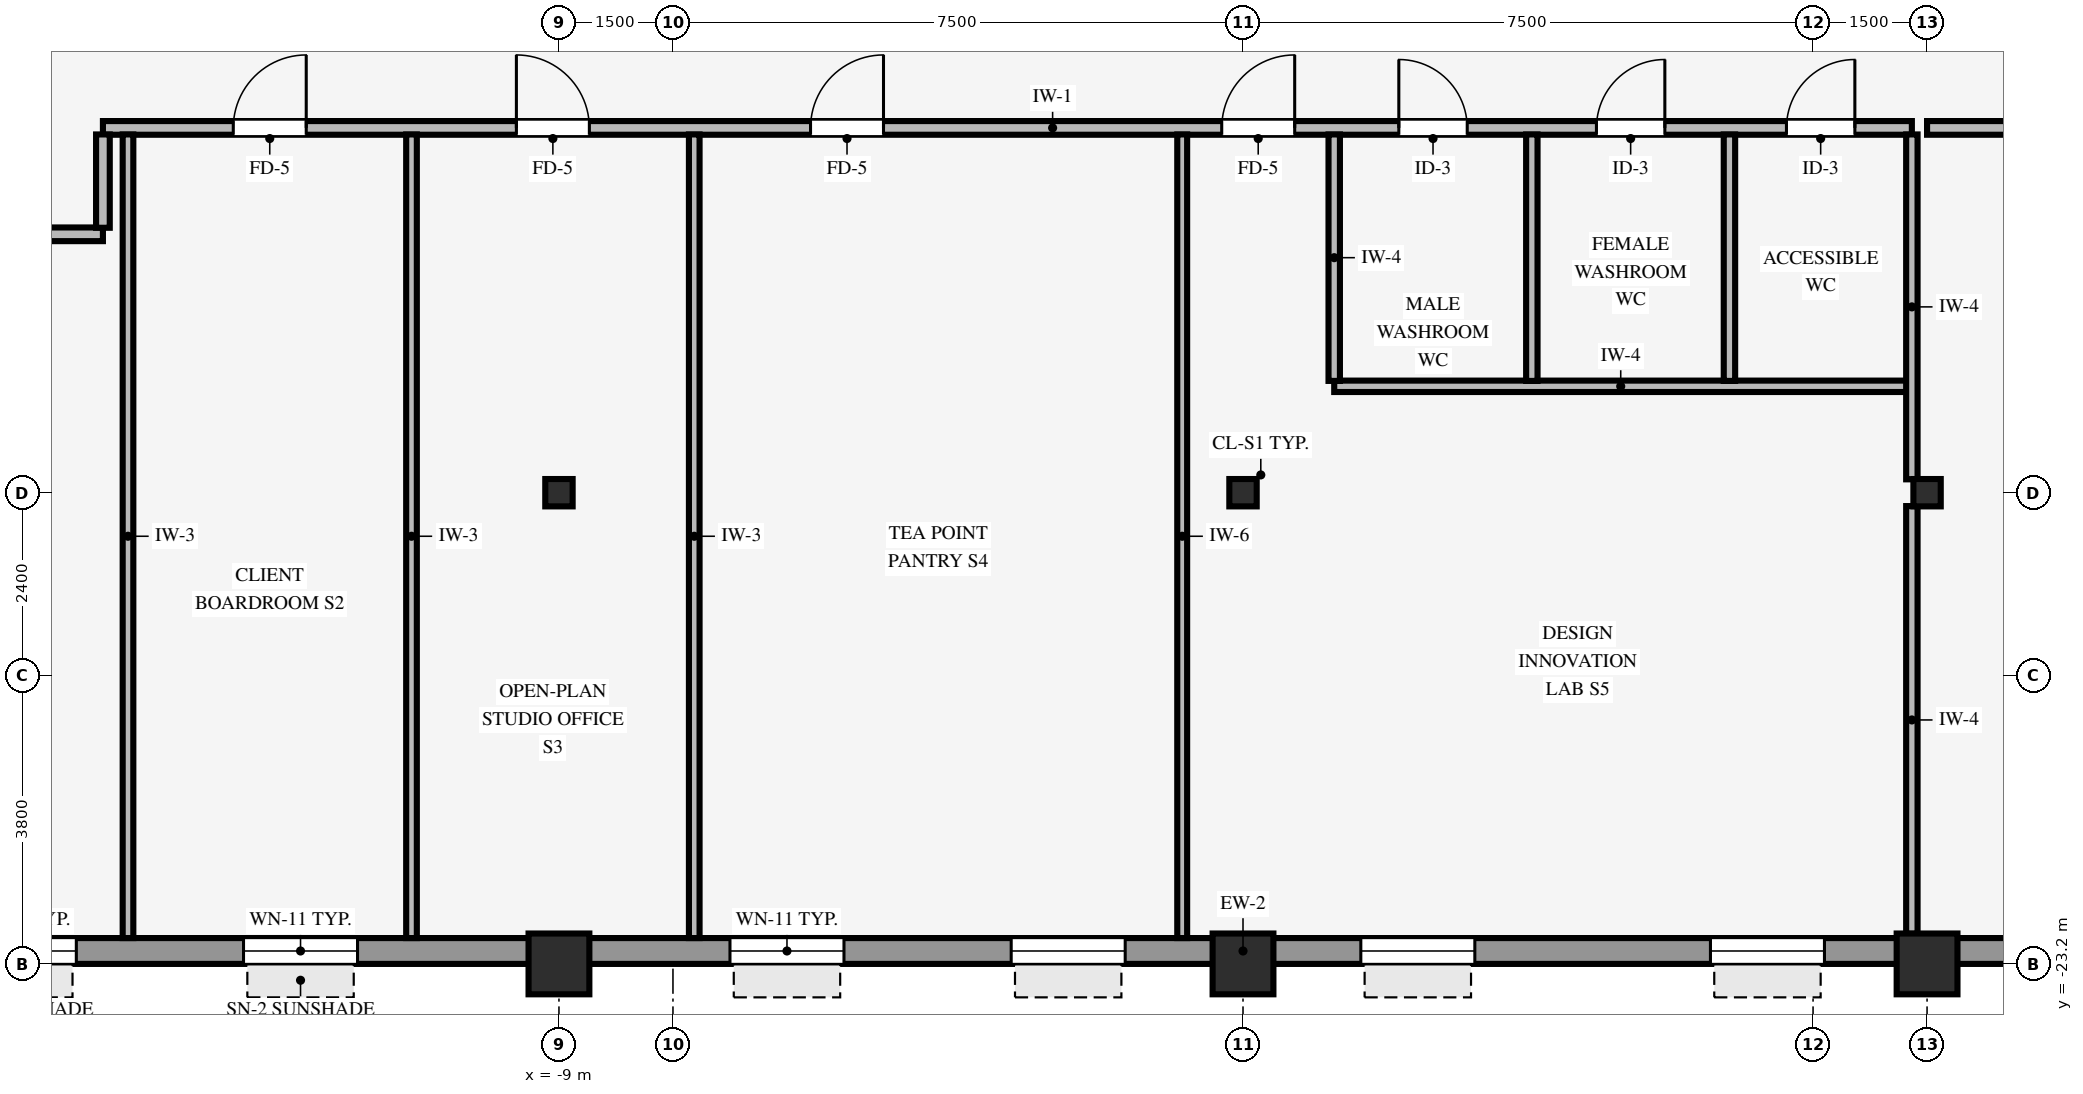
"""IFC4 building model, lengths in metres.
Left out: names, types, materials, properties, quantities, classifications, styles, units other than length and angle.
Written with IfcOpenShell. Run it as: python <this file> out.ifc"""

import sys

from ifc_helpers import new_model, si_unit, direction, frame, frame_2d, origin, origin_2d, place, context, subcontext, project, spatial, rectangle, hollow_rectangle, i_section, extrude, source, transform, mapped, element, fill, save


model = new_model("IFC4")
c1 = context("Model", 3, precision=1e-05, world=origin(), true_north=direction((0.0, 1.0)))
c2 = subcontext(c1, "Body", "Model", "MODEL_VIEW")
j1 = project(units=[si_unit("LENGTHUNIT", "METRE"), si_unit("PLANEANGLEUNIT", "RADIAN")], contexts=[c1])
p1 = place(None, origin())
s1 = spatial("IfcSite", under=j1, at=p1, CompositionType="ELEMENT")
p2 = place(p1, origin())
s2 = spatial("IfcBuilding", under=s1, at=p2, CompositionType="ELEMENT")
p3 = place(p2, frame((0.0, 0.0, 67.75)))
s3 = spatial("IfcBuildingStorey", under=s2, at=p3, CompositionType="ELEMENT", Elevation=67.75)
for number, where, z_axis, x_axis in (
    (1, (-9.0, -23.2, 0.0), (0.0, 0.0, 1.0), (1.0, 0.0, 0.0)),
    (2, (0.0, -23.2, 0.0), (0.0, 0.0, 1.0), (1.0, 0.0, 0.0)),
    (3, (9.0, -23.2, 0.0), (0.0, 0.0, 1.0), (1.0, 0.0, 0.0)),
):
    element("IfcColumn", number, at=place(p3, frame(where, z_axis=z_axis, x_axis=x_axis)), inside=s3, PredefinedType="COLUMN", context=c2, shape_type="SweptSolid", body=[
        extrude(hollow_rectangle(XDim=0.8, YDim=0.8, WallThickness=0.055, InnerFilletRadius=0.055, OuterFilletRadius=0.11, at=origin_2d()), origin(), (0.0, 0.0, 1.0), 3.37),
    ])
for number, where, z_axis, x_axis in (
    (4, (0.0, -17.0, 0.0), (0.0, 0.0, 1.0), (1.0, 0.0, 0.0)),
    (5, (-9.0, -17.0, 0.0), (0.0, 0.0, 1.0), (1.0, 0.0, 0.0)),
    (6, (9.0, -17.0, 0.0), (0.0, 0.0, 1.0), (1.0, 0.0, 0.0)),
):
    element("IfcColumn", number, at=place(p3, frame(where, z_axis=z_axis, x_axis=x_axis)), inside=s3, PredefinedType="COLUMN", context=c2, shape_type="SweptSolid", body=[
        extrude(i_section(OverallWidth=0.36, OverallDepth=0.36, WebThickness=0.021, FlangeThickness=0.021, FilletRadius=0.018, at=origin_2d()), origin(), (0.0, 0.0, 1.0), 3.37),
    ])
p4 = place(p3, frame((-19.4, -23.03, 0.0), z_axis=(0.0, 0.0, 1.0), x_axis=(1.0, 0.0, 0.0)))
e7 = element("IfcWall", 7, at=p4, inside=s3, PredefinedType="STANDARD", context=c2, shape_type="SweptSolid", body=[
    extrude(rectangle(XDim=38.8, YDim=0.34, at=frame_2d((19.4, 0.0))), origin(), (0.0, 0.0, 1.0), 2.705),
])
p5 = place(p4, frame((2.55, 0.0, 0.8)))
e8 = element("IfcOpeningElement", 8, at=p5, cuts=e7, PredefinedType="OPENING", context=c2, shape_type="SweptSolid", body=[
    extrude(rectangle(XDim=1.5, YDim=1.6, at=frame_2d((0.75, 0.8))), frame((0.0, 0.18, 0.0), z_axis=(0.0, -1.0, 0.0), x_axis=(1.0, 0.0, 0.0)), (0.0, 0.0, 1.0), 0.36),
])
p6 = place(p4, frame((6.25, 0.0, 0.8)))
e9 = element("IfcOpeningElement", 9, at=p6, cuts=e7, PredefinedType="OPENING", context=c2, shape_type="SweptSolid", body=[
    extrude(rectangle(XDim=1.5, YDim=1.6, at=frame_2d((0.75, 0.8))), frame((0.0, 0.18, 0.0), z_axis=(0.0, -1.0, 0.0), x_axis=(1.0, 0.0, 0.0)), (0.0, 0.0, 1.0), 0.36),
])
p7 = place(p4, frame((12.65, 0.0, 0.8)))
e10 = element("IfcOpeningElement", 10, at=p7, cuts=e7, PredefinedType="OPENING", context=c2, shape_type="SweptSolid", body=[
    extrude(rectangle(XDim=1.5, YDim=1.6, at=frame_2d((0.75, 0.8))), frame((0.0, 0.18, 0.0), z_axis=(0.0, -1.0, 0.0), x_axis=(1.0, 0.0, 0.0)), (0.0, 0.0, 1.0), 0.36),
])
p8 = place(p4, frame((16.35, 0.0, 0.8)))
e11 = element("IfcOpeningElement", 11, at=p8, cuts=e7, PredefinedType="OPENING", context=c2, shape_type="SweptSolid", body=[
    extrude(rectangle(XDim=1.5, YDim=1.6, at=frame_2d((0.75, 0.8))), frame((0.0, 0.18, 0.0), z_axis=(0.0, -1.0, 0.0), x_axis=(1.0, 0.0, 0.0)), (0.0, 0.0, 1.0), 0.36),
])
p9 = place(p4, frame((20.95, 0.0, 0.8)))
e12 = element("IfcOpeningElement", 12, at=p9, cuts=e7, PredefinedType="OPENING", context=c2, shape_type="SweptSolid", body=[
    extrude(rectangle(XDim=1.5, YDim=1.6, at=frame_2d((0.75, 0.8))), frame((0.0, 0.18, 0.0), z_axis=(0.0, -1.0, 0.0), x_axis=(1.0, 0.0, 0.0)), (0.0, 0.0, 1.0), 0.36),
])
p10 = place(p4, frame((25.55, 0.0, 0.8)))
e13 = element("IfcOpeningElement", 13, at=p10, cuts=e7, PredefinedType="OPENING", context=c2, shape_type="SweptSolid", body=[
    extrude(rectangle(XDim=1.5, YDim=1.6, at=frame_2d((0.75, 0.8))), frame((0.0, 0.18, 0.0), z_axis=(0.0, -1.0, 0.0), x_axis=(1.0, 0.0, 0.0)), (0.0, 0.0, 1.0), 0.36),
])
p11 = place(p4, frame((30.15, 0.0, 0.8)))
e14 = element("IfcOpeningElement", 14, at=p11, cuts=e7, PredefinedType="OPENING", context=c2, shape_type="SweptSolid", body=[
    extrude(rectangle(XDim=1.5, YDim=1.6, at=frame_2d((0.75, 0.8))), frame((0.0, 0.18, 0.0), z_axis=(0.0, -1.0, 0.0), x_axis=(1.0, 0.0, 0.0)), (0.0, 0.0, 1.0), 0.36),
])
p12 = place(p4, frame((34.75, 0.0, 0.8)))
e15 = element("IfcOpeningElement", 15, at=p12, cuts=e7, PredefinedType="OPENING", context=c2, shape_type="SweptSolid", body=[
    extrude(rectangle(XDim=1.5, YDim=1.6, at=frame_2d((0.75, 0.8))), frame((0.0, 0.18, 0.0), z_axis=(0.0, -1.0, 0.0), x_axis=(1.0, 0.0, 0.0)), (0.0, 0.0, 1.0), 0.36),
])
p13 = place(p3, frame((1.2, -15.6, 0.0), z_axis=(0.0, 0.0, 1.0), x_axis=(1.0, 0.0, 0.0)))
e16 = element("IfcWall", 16, at=p13, inside=s3, PredefinedType="PARTITIONING", context=c2, shape_type="SweptSolid", body=[
    extrude(rectangle(XDim=7.539, YDim=0.15, at=frame_2d((3.77, 0.0))), origin(), (0.0, 0.0, 1.0), 3.36),
])
p14 = place(p3, frame((-20.5, -13.6, 0.0), z_axis=(0.0, 0.0, 1.0), x_axis=(1.0, 0.0, 0.0)))
e17 = element("IfcWall", 17, at=p14, inside=s3, PredefinedType="PARTITIONING", context=c2, shape_type="SweptSolid", body=[
    extrude(rectangle(XDim=5.5, YDim=0.18, at=frame_2d((2.75, 0.0))), origin(), (0.0, 0.0, 1.0), 2.942),
])
p15 = place(p14, frame((2.27, 0.0, 0.0)))
e18 = element("IfcOpeningElement", 18, at=p15, cuts=e17, PredefinedType="OPENING", context=c2, shape_type="SweptSolid", body=[
    extrude(rectangle(XDim=0.96, YDim=2.1, at=frame_2d((0.48, 1.05))), frame((0.0, 0.1, 0.0), z_axis=(0.0, -1.0, 0.0), x_axis=(1.0, 0.0, 0.0)), (0.0, 0.0, 1.0), 0.2),
])
p16 = place(p3, frame((-15.0, -12.2, 0.0), z_axis=(0.0, 0.0, 1.0), x_axis=(1.0, 0.0, 0.0)))
e19 = element("IfcWall", 19, at=p16, inside=s3, PredefinedType="PARTITIONING", context=c2, shape_type="SweptSolid", body=[
    extrude(rectangle(XDim=23.8, YDim=0.18, at=frame_2d((11.9, 0.0))), origin(), (0.0, 0.0, 1.0), 3.36),
])
p17 = place(p16, frame((9.31, 0.0, 0.0)))
e20 = element("IfcOpeningElement", 20, at=p17, cuts=e19, PredefinedType="OPENING", context=c2, shape_type="SweptSolid", body=[
    extrude(rectangle(XDim=0.96, YDim=2.1, at=frame_2d((0.48, 1.05))), frame((0.0, 0.1, 0.0), z_axis=(0.0, -1.0, 0.0), x_axis=(1.0, 0.0, 0.0)), (0.0, 0.0, 1.0), 0.2),
])
p18 = place(p16, frame((1.715, 0.0, 0.0)))
e21 = element("IfcOpeningElement", 21, at=p18, cuts=e19, PredefinedType="OPENING", context=c2, shape_type="SweptSolid", body=[
    extrude(rectangle(XDim=0.96, YDim=2.1, at=frame_2d((0.48, 1.05))), frame((0.0, 0.1, 0.0), z_axis=(0.0, -1.0, 0.0), x_axis=(1.0, 0.0, 0.0)), (0.0, 0.0, 1.0), 0.2),
])
p19 = place(p16, frame((5.44, 0.0, 0.0)))
e22 = element("IfcOpeningElement", 22, at=p19, cuts=e19, PredefinedType="OPENING", context=c2, shape_type="SweptSolid", body=[
    extrude(rectangle(XDim=0.96, YDim=2.1, at=frame_2d((0.48, 1.05))), frame((0.0, 0.1, 0.0), z_axis=(0.0, -1.0, 0.0), x_axis=(1.0, 0.0, 0.0)), (0.0, 0.0, 1.0), 0.2),
])
p20 = place(p16, frame((19.65, 0.0, 0.0)))
e23 = element("IfcOpeningElement", 23, at=p20, cuts=e19, PredefinedType="OPENING", context=c2, shape_type="SweptSolid", body=[
    extrude(rectangle(XDim=0.9, YDim=2.1, at=frame_2d((0.45, 1.05))), frame((0.0, 0.1, 0.0), z_axis=(0.0, -1.0, 0.0), x_axis=(1.0, 0.0, 0.0)), (0.0, 0.0, 1.0), 0.2),
])
p21 = place(p16, frame((17.05, 0.0, 0.0)))
e24 = element("IfcOpeningElement", 24, at=p21, cuts=e19, PredefinedType="OPENING", context=c2, shape_type="SweptSolid", body=[
    extrude(rectangle(XDim=0.9, YDim=2.1, at=frame_2d((0.45, 1.05))), frame((0.0, 0.1, 0.0), z_axis=(0.0, -1.0, 0.0), x_axis=(1.0, 0.0, 0.0)), (0.0, 0.0, 1.0), 0.2),
])
p22 = place(p16, frame((22.15, 0.0, 0.0)))
e25 = element("IfcOpeningElement", 25, at=p22, cuts=e19, PredefinedType="OPENING", context=c2, shape_type="SweptSolid", body=[
    extrude(rectangle(XDim=0.9, YDim=2.1, at=frame_2d((0.45, 1.05))), frame((0.0, 0.1, 0.0), z_axis=(0.0, -1.0, 0.0), x_axis=(1.0, 0.0, 0.0)), (0.0, 0.0, 1.0), 0.2),
])
p23 = place(p16, frame((14.72, 0.0, 0.0)))
e26 = element("IfcOpeningElement", 26, at=p23, cuts=e19, PredefinedType="OPENING", context=c2, shape_type="SweptSolid", body=[
    extrude(rectangle(XDim=0.96, YDim=2.1, at=frame_2d((0.48, 1.05))), frame((0.0, 0.1, 0.0), z_axis=(0.0, -1.0, 0.0), x_axis=(1.0, 0.0, 0.0)), (0.0, 0.0, 1.0), 0.2),
])
p24 = place(p3, frame((9.0, -12.2, 0.0), z_axis=(0.0, 0.0, 1.0), x_axis=(1.0, 0.0, 0.0)))
e27 = element("IfcWall", 27, at=p24, inside=s3, PredefinedType="PARTITIONING", context=c2, shape_type="SweptSolid", body=[
    extrude(rectangle(XDim=6.0, YDim=0.18, at=frame_2d((3.0, 0.0))), origin(), (0.0, 0.0, 1.0), 3.36),
])
p25 = place(p24, frame((2.52, 0.0, 0.0)))
e28 = element("IfcOpeningElement", 28, at=p25, cuts=e27, PredefinedType="OPENING", context=c2, shape_type="SweptSolid", body=[
    extrude(rectangle(XDim=0.96, YDim=2.1, at=frame_2d((0.48, 1.05))), frame((0.0, 0.1, 0.0), z_axis=(0.0, -1.0, 0.0), x_axis=(1.0, 0.0, 0.0)), (0.0, 0.0, 1.0), 0.2),
])
p26 = place(p3, frame((-15.0, -13.514, 0.0), z_axis=(0.0, 0.0, 1.0), x_axis=(0.0, 1.0, 0.0)))
e29 = element("IfcWall", 29, at=p26, inside=s3, PredefinedType="PARTITIONING", context=c2, shape_type="SweptSolid", body=[
    extrude(rectangle(XDim=1.228, YDim=0.18, at=frame_2d((0.614, 0.0))), origin(), (0.0, 0.0, 1.0), 3.36),
])
for number, where, z_axis, x_axis in (
    (30, (-14.67, -22.86, 0.0), (0.0, 0.0, 1.0), (0.0, 1.0, 0.0)),
    (31, (-10.94, -22.86, 0.0), (0.0, 0.0, 1.0), (0.0, 1.0, 0.0)),
    (32, (-7.22, -22.86, 0.0), (0.0, 0.0, 1.0), (0.0, 1.0, 0.0)),
):
    element("IfcWall", number, at=place(p3, frame(where, z_axis=z_axis, x_axis=x_axis)), inside=s3, PredefinedType="PARTITIONING", context=c2, shape_type="SweptSolid", body=[
        extrude(rectangle(XDim=10.574, YDim=0.14, at=frame_2d((5.287, 0.0))), origin(), (0.0, 0.0, 1.0), 3.36),
    ])
p27 = place(p3, frame((-0.8, -22.86, 0.0), z_axis=(0.0, 0.0, 1.0), x_axis=(0.0, 1.0, 0.0)))
e33 = element("IfcWall", 33, at=p27, inside=s3, PredefinedType="PARTITIONING", context=c2, shape_type="SweptSolid", body=[
    extrude(rectangle(XDim=10.574, YDim=0.13, at=frame_2d((5.287, 0.0))), origin(), (0.0, 0.0, 1.0), 3.36),
])
for number, where, z_axis, x_axis in (
    (34, (1.2, -15.529, 0.0), (0.0, 0.0, 1.0), (0.0, 1.0, 0.0)),
    (35, (3.8, -15.529, 0.0), (0.0, 0.0, 1.0), (0.0, 1.0, 0.0)),
    (36, (6.4, -15.529, 0.0), (0.0, 0.0, 1.0), (0.0, 1.0, 0.0)),
):
    element("IfcWall", number, at=place(p3, frame(where, z_axis=z_axis, x_axis=x_axis)), inside=s3, PredefinedType="PARTITIONING", context=c2, shape_type="SweptSolid", body=[
        extrude(rectangle(XDim=3.243, YDim=0.15, at=frame_2d((1.622, 0.0))), origin(), (0.0, 0.0, 1.0), 3.36),
    ])
p28 = place(p3, frame((8.8, -22.804, 0.0), z_axis=(0.0, 0.0, 1.0), x_axis=(0.0, 1.0, 0.0)))
e37 = element("IfcWall", 37, at=p28, inside=s3, PredefinedType="PARTITIONING", context=c2, shape_type="SweptSolid", body=[
    extrude(rectangle(XDim=5.628, YDim=0.15, at=frame_2d((2.814, 0.0))), origin(), (0.0, 0.0, 1.0), 2.738),
])
p29 = place(p3, frame((8.8, -16.824, 0.0), z_axis=(0.0, 0.0, 1.0), x_axis=(0.0, 1.0, 0.0)))
e38 = element("IfcWall", 38, at=p29, inside=s3, PredefinedType="PARTITIONING", context=c2, shape_type="SweptSolid", body=[
    extrude(rectangle(XDim=4.538, YDim=0.15, at=frame_2d((2.269, 0.0))), origin(), (0.0, 0.0, 1.0), 2.738),
])
m1 = source(origin(), c2, "Body", "SweptSolid", [
    extrude(rectangle(XDim=1.5, YDim=1.6, at=frame_2d((0.75, 0.8))), frame((0.0, 0.03, 0.0), z_axis=(0.0, -1.0, 0.0), x_axis=(1.0, 0.0, 0.0)), (0.0, 0.0, 1.0), 0.06),
])
p30 = place(p5, origin())
e39 = element("IfcWindow", 39, at=p30, inside=s3, PartitioningType="SINGLE_PANEL", PredefinedType="WINDOW", context=c2, shape_type="MappedRepresentation", body=[
    mapped(m1, transform((0.0, 0.0, 0.0), scale=1.0)),
])
fill(e8, e39)
p31 = place(p6, origin())
e40 = element("IfcWindow", 40, at=p31, inside=s3, PartitioningType="SINGLE_PANEL", PredefinedType="WINDOW", context=c2, shape_type="MappedRepresentation", body=[
    mapped(m1, transform((0.0, 0.0, 0.0), scale=1.0)),
])
fill(e9, e40)
p32 = place(p7, origin())
e41 = element("IfcWindow", 41, at=p32, inside=s3, PartitioningType="SINGLE_PANEL", PredefinedType="WINDOW", context=c2, shape_type="MappedRepresentation", body=[
    mapped(m1, transform((0.0, 0.0, 0.0), scale=1.0)),
])
fill(e10, e41)
p33 = place(p8, origin())
e42 = element("IfcWindow", 42, at=p33, inside=s3, PartitioningType="SINGLE_PANEL", PredefinedType="WINDOW", context=c2, shape_type="MappedRepresentation", body=[
    mapped(m1, transform((0.0, 0.0, 0.0), scale=1.0)),
])
fill(e11, e42)
p34 = place(p9, origin())
e43 = element("IfcWindow", 43, at=p34, inside=s3, PartitioningType="SINGLE_PANEL", PredefinedType="WINDOW", context=c2, shape_type="MappedRepresentation", body=[
    mapped(m1, transform((0.0, 0.0, 0.0), scale=1.0)),
])
fill(e12, e43)
p35 = place(p10, origin())
e44 = element("IfcWindow", 44, at=p35, inside=s3, PartitioningType="SINGLE_PANEL", PredefinedType="WINDOW", context=c2, shape_type="MappedRepresentation", body=[
    mapped(m1, transform((0.0, 0.0, 0.0), scale=1.0)),
])
fill(e13, e44)
m2 = source(origin(), c2, "Body", "SweptSolid", [
    extrude(rectangle(XDim=0.96, YDim=2.1, at=frame_2d((0.48, 1.05))), frame((0.0, 0.025, 0.0), z_axis=(0.0, -1.0, 0.0), x_axis=(1.0, 0.0, 0.0)), (0.0, 0.0, 1.0), 0.05),
])
p36 = place(p17, origin())
e45 = element("IfcDoor", 45, at=p36, inside=s3, OperationType="SINGLE_SWING_RIGHT", PredefinedType="DOOR", context=c2, shape_type="MappedRepresentation", body=[
    mapped(m2, transform((0.0, 0.0, 0.0), scale=1.0)),
])
fill(e20, e45)
p37 = place(p18, origin())
e46 = element("IfcDoor", 46, at=p37, inside=s3, OperationType="SINGLE_SWING_RIGHT", PredefinedType="DOOR", context=c2, shape_type="MappedRepresentation", body=[
    mapped(m2, transform((0.0, 0.0, 0.0), scale=1.0)),
])
fill(e21, e46)
p38 = place(p19, origin())
e47 = element("IfcDoor", 47, at=p38, inside=s3, OperationType="SINGLE_SWING_LEFT", PredefinedType="DOOR", context=c2, shape_type="MappedRepresentation", body=[
    mapped(m2, transform((0.0, 0.0, 0.0), scale=1.0)),
])
fill(e22, e47)
m3 = source(origin(), c2, "Body", "SweptSolid", [
    extrude(rectangle(XDim=0.9, YDim=2.1, at=frame_2d((0.45, 1.05))), frame((0.0, 0.025, 0.0), z_axis=(0.0, -1.0, 0.0), x_axis=(1.0, 0.0, 0.0)), (0.0, 0.0, 1.0), 0.05),
])
p39 = place(p20, origin())
e48 = element("IfcDoor", 48, at=p39, inside=s3, OperationType="SINGLE_SWING_RIGHT", PredefinedType="DOOR", context=c2, shape_type="MappedRepresentation", body=[
    mapped(m3, transform((0.0, 0.0, 0.0), scale=1.0)),
])
fill(e23, e48)
p40 = place(p21, origin())
e49 = element("IfcDoor", 49, at=p40, inside=s3, OperationType="SINGLE_SWING_LEFT", PredefinedType="DOOR", context=c2, shape_type="MappedRepresentation", body=[
    mapped(m3, transform((0.0, 0.0, 0.0), scale=1.0)),
])
fill(e24, e49)
p41 = place(p22, origin())
e50 = element("IfcDoor", 50, at=p41, inside=s3, OperationType="SINGLE_SWING_RIGHT", PredefinedType="DOOR", context=c2, shape_type="MappedRepresentation", body=[
    mapped(m3, transform((0.0, 0.0, 0.0), scale=1.0)),
])
fill(e25, e50)
p42 = place(p23, origin())
e51 = element("IfcDoor", 51, at=p42, inside=s3, OperationType="SINGLE_SWING_RIGHT", PredefinedType="DOOR", context=c2, shape_type="MappedRepresentation", body=[
    mapped(m2, transform((0.0, 0.0, 0.0), scale=1.0)),
])
fill(e26, e51)
save(model, sys.argv[1])
